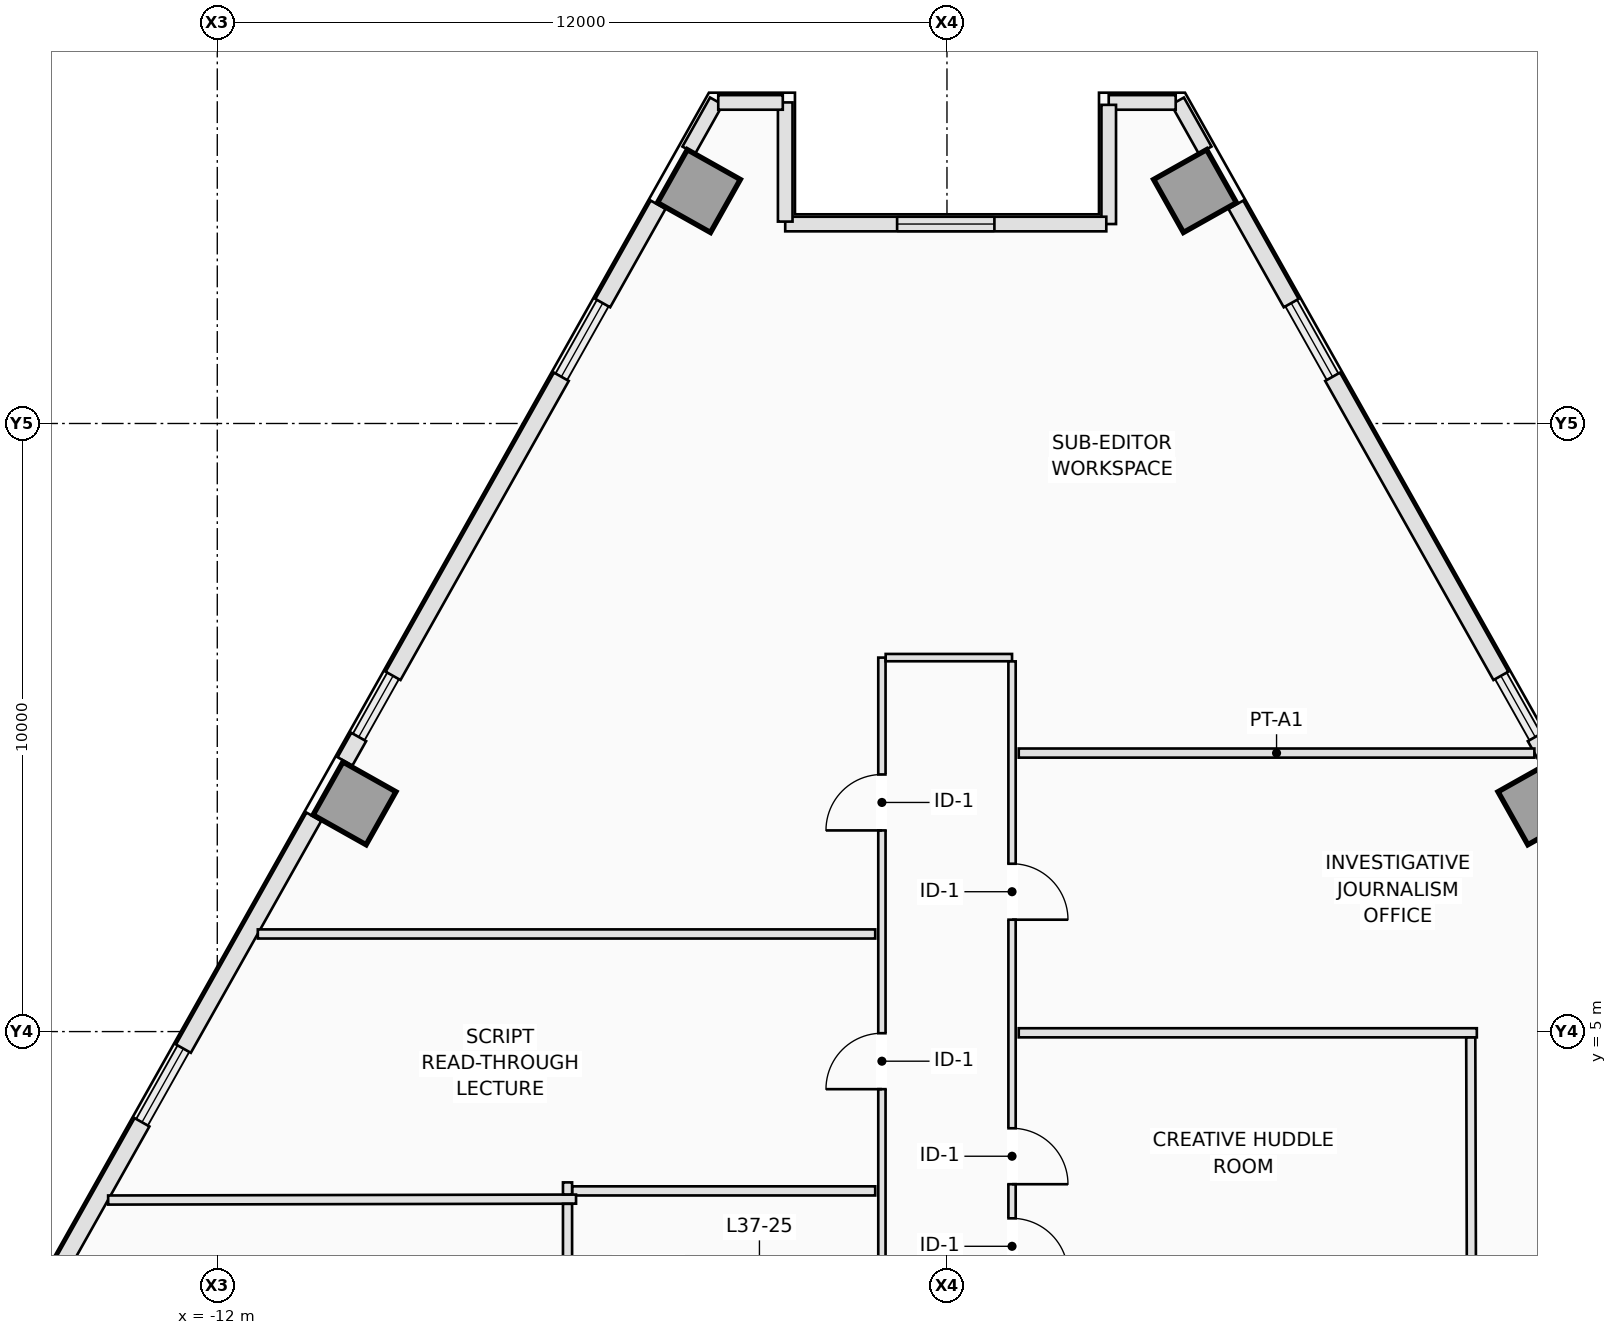
"""IFC4 building model, lengths in metres.
Left out: names, types, materials, properties, quantities, classifications, styles, units other than length and angle.
Written with IfcOpenShell. Run it as: python <this file> out.ifc"""

import sys

from ifc_helpers import new_model, si_unit, direction, frame, frame_2d, origin, origin_2d, place, context, subcontext, project, spatial, rectangle, extrude, element, fill, save


model = new_model("IFC4")
c1 = context("Model", 3, precision=1e-05, world=origin(), true_north=direction((0.0, 1.0)))
c2 = subcontext(c1, "Body", "Model", "MODEL_VIEW")
j1 = project(units=[si_unit("LENGTHUNIT", "METRE"), si_unit("PLANEANGLEUNIT", "RADIAN")], contexts=[c1])
p1 = place(None, origin())
s1 = spatial("IfcSite", under=j1, at=p1, CompositionType="ELEMENT")
p2 = place(p1, origin())
s2 = spatial("IfcBuilding", under=s1, at=p2, CompositionType="ELEMENT")
p3 = place(p2, frame((0.0, 0.0, 137.0)))
s3 = spatial("IfcBuildingStorey", under=s2, at=p3, CompositionType="ELEMENT", Elevation=137.0)
for number, where, z_axis, x_axis in (
    (1, (9.743, 8.753, 0.0), (0.0, 0.0, 1.0), (0.872, 0.49, 0.0)),
    (2, (4.079, 18.822, 0.0), (0.0, 0.0, 1.0), (0.872, 0.49, 0.0)),
    (3, (-4.079, 18.822, 0.0), (0.0, 0.0, 1.0), (-0.872, 0.49, 0.0)),
    (4, (-9.743, 8.753, 0.0), (0.0, 0.0, 1.0), (-0.872, 0.49, 0.0)),
):
    element("IfcColumn", number, at=place(p3, frame(where, z_axis=z_axis, x_axis=x_axis)), inside=s3, PredefinedType="COLUMN", context=c2, shape_type="SweptSolid", body=[
        extrude(rectangle(XDim=1.0, YDim=1.0, at=origin_2d()), origin(), (0.0, 0.0, 1.0), 3.5),
    ])
p4 = place(p3, frame((3.792, 20.302, 0.0), z_axis=(0.0, 0.0, 1.0), x_axis=(0.490048346303, -0.871695255399, 0.0)))
e5 = element("IfcWall", 5, at=p4, inside=s3, PredefinedType="STANDARD", context=c2, shape_type="SweptSolid", body=[
    extrude(rectangle(XDim=0.926, YDim=0.24, at=frame_2d((0.463, 0.0))), origin(), (0.0, 0.0, 1.0), 3.25),
])
p5 = place(p3, frame((4.751, 18.597, 0.0), z_axis=(0.0, 0.0, 1.0), x_axis=(0.490248749158, -0.871582562899, 0.0)))
e6 = element("IfcWall", 6, at=p5, inside=s3, PredefinedType="STANDARD", context=c2, shape_type="SweptSolid", body=[
    extrude(rectangle(XDim=1.856, YDim=0.28, at=frame_2d((0.928, 0.0))), origin(), (0.0, 0.0, 1.0), 3.25),
])
p6 = place(p3, frame((6.342, 15.768, 0.0), z_axis=(0.0, 0.0, 1.0), x_axis=(0.490289995219, -0.871559361483, 0.0)))
e7 = element("IfcWall", 7, at=p6, inside=s3, PredefinedType="STANDARD", context=c2, shape_type="SweptSolid", body=[
    extrude(rectangle(XDim=5.643, YDim=0.28, at=frame_2d((2.822, 0.0))), origin(), (0.0, 0.0, 1.0), 3.25),
])
p7 = place(p3, frame((9.674, 9.845, 0.0), z_axis=(0.0, 0.0, 1.0), x_axis=(0.490412424957, -0.871490478116, 0.0)))
e8 = element("IfcWall", 8, at=p7, inside=s3, PredefinedType="STANDARD", context=c2, shape_type="SweptSolid", body=[
    extrude(rectangle(XDim=0.46, YDim=0.28, at=frame_2d((0.23, 0.0))), origin(), (0.0, 0.0, 1.0), 3.25),
])
p8 = place(p3, frame((-4.246, 19.495, 0.0), z_axis=(0.0, 0.0, 1.0), x_axis=(0.490048346303, 0.871695255399, 0.0)))
e9 = element("IfcWall", 9, at=p8, inside=s3, PredefinedType="STANDARD", context=c2, shape_type="SweptSolid", body=[
    extrude(rectangle(XDim=0.926, YDim=0.24, at=frame_2d((0.463, 0.0))), origin(), (0.0, 0.0, 1.0), 3.25),
])
p9 = place(p3, frame((-9.9, 9.444, 0.0), z_axis=(0.0, 0.0, 1.0), x_axis=(0.490412424957, 0.871490478116, 0.0)))
e10 = element("IfcWall", 10, at=p9, inside=s3, PredefinedType="STANDARD", context=c2, shape_type="SweptSolid", body=[
    extrude(rectangle(XDim=0.46, YDim=0.28, at=frame_2d((0.23, 0.0))), origin(), (0.0, 0.0, 1.0), 3.25),
])
p10 = place(p3, frame((-9.109, 10.85, 0.0), z_axis=(0.0, 0.0, 1.0), x_axis=(0.490289995219, 0.871559361483, 0.0)))
e11 = element("IfcWall", 11, at=p10, inside=s3, PredefinedType="STANDARD", context=c2, shape_type="SweptSolid", body=[
    extrude(rectangle(XDim=5.643, YDim=0.28, at=frame_2d((2.822, 0.0))), origin(), (0.0, 0.0, 1.0), 3.25),
])
p11 = place(p3, frame((-5.661, 16.98, 0.0), z_axis=(0.0, 0.0, 1.0), x_axis=(0.490248749158, 0.871582562899, 0.0)))
e12 = element("IfcWall", 12, at=p11, inside=s3, PredefinedType="STANDARD", context=c2, shape_type="SweptSolid", body=[
    extrude(rectangle(XDim=1.856, YDim=0.28, at=frame_2d((0.928, 0.0))), origin(), (0.0, 0.0, 1.0), 3.25),
])
p12 = place(p3, frame((-15.383, -0.305, 0.0), z_axis=(0.0, 0.0, 1.0), x_axis=(0.490232095789, 0.871591929895, 0.0)))
e13 = element("IfcWall", 13, at=p12, inside=s3, PredefinedType="STANDARD", context=c2, shape_type="SweptSolid", body=[
    extrude(rectangle(XDim=4.375, YDim=0.28, at=frame_2d((2.188, 0.0))), origin(), (0.0, 0.0, 1.0), 3.25),
])
p13 = place(p3, frame((-12.557, 4.72, 0.0), z_axis=(0.0, 0.0, 1.0), x_axis=(0.490274486291, 0.871568085747, 0.0)))
e14 = element("IfcWall", 14, at=p13, inside=s3, PredefinedType="STANDARD", context=c2, shape_type="SweptSolid", body=[
    extrude(rectangle(XDim=4.375, YDim=0.28, at=frame_2d((2.188, 0.0))), origin(), (0.0, 0.0, 1.0), 3.25),
])
p14 = place(p3, frame((3.761, 20.28, 0.0), z_axis=(0.0, 0.0, 1.0), x_axis=(-1.0, 0.0, 0.0)))
e15 = element("IfcWall", 15, at=p14, inside=s3, PredefinedType="STANDARD", context=c2, shape_type="SweptSolid", body=[
    extrude(rectangle(XDim=1.102, YDim=0.24, at=frame_2d((0.551, 0.0))), origin(), (0.0, 0.0, 1.0), 3.25),
])
p15 = place(p3, frame((2.66, 20.24, 0.0), z_axis=(0.0, 0.0, 1.0), x_axis=(0.0, -1.0, 0.0)))
e16 = element("IfcWall", 16, at=p15, inside=s3, PredefinedType="STANDARD", context=c2, shape_type="SweptSolid", body=[
    extrude(rectangle(XDim=1.96, YDim=0.24, at=frame_2d((0.98, 0.0))), origin(), (0.0, 0.0, 1.0), 3.25),
])
p16 = place(p3, frame((2.62, 18.28, 0.0), z_axis=(0.0, 0.0, 1.0), x_axis=(-1.0, 0.0, 0.0)))
e17 = element("IfcWall", 17, at=p16, inside=s3, PredefinedType="STANDARD", context=c2, shape_type="SweptSolid", body=[
    extrude(rectangle(XDim=5.28, YDim=0.24, at=frame_2d((2.64, 0.0))), origin(), (0.0, 0.0, 1.0), 3.25),
])
p17 = place(p16, frame((1.84, 0.0, 0.9)))
e18 = element("IfcOpeningElement", 18, at=p17, cuts=e17, PredefinedType="OPENING", context=c2, shape_type="SweptSolid", body=[
    extrude(rectangle(XDim=1.6, YDim=2.1, at=frame_2d((0.8, 1.05))), frame((0.0, 0.13, 0.0), z_axis=(0.0, -1.0, 0.0), x_axis=(1.0, 0.0, 0.0)), (0.0, 0.0, 1.0), 0.26),
])
p18 = place(p3, frame((-2.66, 18.32, 0.0), z_axis=(0.0, 0.0, 1.0), x_axis=(0.0, 1.0, 0.0)))
e19 = element("IfcWall", 19, at=p18, inside=s3, PredefinedType="STANDARD", context=c2, shape_type="SweptSolid", body=[
    extrude(rectangle(XDim=1.96, YDim=0.24, at=frame_2d((0.98, 0.0))), origin(), (0.0, 0.0, 1.0), 3.25),
])
p19 = place(p3, frame((-2.7, 20.28, 0.0), z_axis=(0.0, 0.0, 1.0), x_axis=(-1.0, 0.0, 0.0)))
e20 = element("IfcWall", 20, at=p19, inside=s3, PredefinedType="STANDARD", context=c2, shape_type="SweptSolid", body=[
    extrude(rectangle(XDim=1.062, YDim=0.24, at=frame_2d((0.531, 0.0))), origin(), (0.0, 0.0, 1.0), 3.25),
])
p20 = place(p3, frame((-1.07, -2.338, 0.0), z_axis=(0.0, 0.0, 1.0), x_axis=(0.0, 1.0, 0.0)))
e21 = element("IfcWall", 21, at=p20, inside=s3, PredefinedType="PARTITIONING", context=c2, shape_type="SweptSolid", body=[
    extrude(rectangle(XDim=13.488, YDim=0.12, at=frame_2d((6.744, 0.0))), origin(), (0.0, 0.0, 1.0), 3.25),
])
p21 = place(p20, frame((10.646, 0.0, 0.0)))
e22 = element("IfcOpeningElement", 22, at=p21, cuts=e21, PredefinedType="OPENING", context=c2, shape_type="SweptSolid", body=[
    extrude(rectangle(XDim=0.92, YDim=2.12, at=frame_2d((0.46, 1.06))), frame((0.0, 0.07, 0.0), z_axis=(0.0, -1.0, 0.0), x_axis=(1.0, 0.0, 0.0)), (0.0, 0.0, 1.0), 0.14),
])
p22 = place(p20, frame((6.391, 0.0, 0.0)))
e23 = element("IfcOpeningElement", 23, at=p22, cuts=e21, PredefinedType="OPENING", context=c2, shape_type="SweptSolid", body=[
    extrude(rectangle(XDim=0.92, YDim=2.12, at=frame_2d((0.46, 1.06))), frame((0.0, 0.07, 0.0), z_axis=(0.0, -1.0, 0.0), x_axis=(1.0, 0.0, 0.0)), (0.0, 0.0, 1.0), 0.14),
])
p23 = place(p20, frame((2.537, 0.0, 0.0)))
e24 = element("IfcOpeningElement", 24, at=p23, cuts=e21, PredefinedType="OPENING", context=c2, shape_type="SweptSolid", body=[
    extrude(rectangle(XDim=0.92, YDim=2.12, at=frame_2d((0.46, 1.06))), frame((0.0, 0.07, 0.0), z_axis=(0.0, -1.0, 0.0), x_axis=(1.0, 0.0, 0.0)), (0.0, 0.0, 1.0), 0.14),
])
p24 = place(p3, frame((-1.008, 11.15, 0.0), z_axis=(0.0, 0.0, 1.0), x_axis=(1.0, 0.0, 0.0)))
e25 = element("IfcWall", 25, at=p24, inside=s3, PredefinedType="PARTITIONING", context=c2, shape_type="SweptSolid", body=[
    extrude(rectangle(XDim=2.078, YDim=0.12, at=frame_2d((1.039, 0.0))), origin(), (0.0, 0.0, 1.0), 3.25),
])
p25 = place(p3, frame((1.07, 11.088, 0.0), z_axis=(0.0, 0.0, 1.0), x_axis=(0.0, -1.0, 0.0)))
e26 = element("IfcWall", 26, at=p25, inside=s3, PredefinedType="PARTITIONING", context=c2, shape_type="SweptSolid", body=[
    extrude(rectangle(XDim=13.488, YDim=0.12, at=frame_2d((6.744, 0.0))), origin(), (0.0, 0.0, 1.0), 3.25),
])
p26 = place(p25, frame((3.328, 0.0, 0.0)))
e27 = element("IfcOpeningElement", 27, at=p26, cuts=e26, PredefinedType="OPENING", context=c2, shape_type="SweptSolid", body=[
    extrude(rectangle(XDim=0.92, YDim=2.12, at=frame_2d((0.46, 1.06))), frame((0.0, 0.07, 0.0), z_axis=(0.0, -1.0, 0.0), x_axis=(1.0, 0.0, 0.0)), (0.0, 0.0, 1.0), 0.14),
])
p27 = place(p25, frame((7.678, 0.0, 0.0)))
e28 = element("IfcOpeningElement", 28, at=p27, cuts=e26, PredefinedType="OPENING", context=c2, shape_type="SweptSolid", body=[
    extrude(rectangle(XDim=0.92, YDim=2.12, at=frame_2d((0.46, 1.06))), frame((0.0, 0.07, 0.0), z_axis=(0.0, -1.0, 0.0), x_axis=(1.0, 0.0, 0.0)), (0.0, 0.0, 1.0), 0.14),
])
p28 = place(p25, frame((9.159, 0.0, 0.0)))
e29 = element("IfcOpeningElement", 29, at=p28, cuts=e26, PredefinedType="OPENING", context=c2, shape_type="SweptSolid", body=[
    extrude(rectangle(XDim=0.92, YDim=2.12, at=frame_2d((0.46, 1.06))), frame((0.0, 0.07, 0.0), z_axis=(0.0, -1.0, 0.0), x_axis=(1.0, 0.0, 0.0)), (0.0, 0.0, 1.0), 0.14),
])
p29 = place(p25, frame((10.349, 0.0, 0.0)))
e30 = element("IfcOpeningElement", 30, at=p29, cuts=e26, PredefinedType="OPENING", context=c2, shape_type="SweptSolid", body=[
    extrude(rectangle(XDim=0.88, YDim=2.12, at=frame_2d((0.44, 1.06))), frame((0.0, 0.07, 0.0), z_axis=(0.0, -1.0, 0.0), x_axis=(1.0, 0.0, 0.0)), (0.0, 0.0, 1.0), 0.14),
])
p30 = place(p3, frame((9.66, 9.58, 0.0), z_axis=(0.0, 0.0, 1.0), x_axis=(-1.0, 0.0, 0.0)))
e31 = element("IfcWall", 31, at=p30, inside=s3, PredefinedType="PARTITIONING", context=c2, shape_type="SweptSolid", body=[
    extrude(rectangle(XDim=8.48, YDim=0.15, at=frame_2d((4.24, 0.0))), origin(), (0.0, 0.0, 1.0), 3.25),
])
p31 = place(p3, frame((-1.18, 6.605, 0.0), z_axis=(0.0, 0.0, 1.0), x_axis=(-1.0, 0.0, 0.0)))
e32 = element("IfcWall", 32, at=p31, inside=s3, PredefinedType="PARTITIONING", context=c2, shape_type="SweptSolid", body=[
    extrude(rectangle(XDim=10.153, YDim=0.15, at=frame_2d((5.077, 0.0))), origin(), (0.0, 0.0, 1.0), 2.891),
])
p32 = place(p3, frame((8.714, 4.98, 0.0), z_axis=(0.0, 0.0, 1.0), x_axis=(-1.0, 0.0, 0.0)))
e33 = element("IfcWall", 33, at=p32, inside=s3, PredefinedType="PARTITIONING", context=c2, shape_type="SweptSolid", body=[
    extrude(rectangle(XDim=7.534, YDim=0.15, at=frame_2d((3.767, 0.0))), origin(), (0.0, 0.0, 1.0), 3.25),
])
p33 = place(p3, frame((8.625, 0.78, 0.0), z_axis=(0.0, 0.0, 1.0), x_axis=(-0.002664604467, 0.999996449935, 0.0)))
e34 = element("IfcWall", 34, at=p33, inside=s3, PredefinedType="PARTITIONING", context=c2, shape_type="SweptSolid", body=[
    extrude(rectangle(XDim=4.123, YDim=0.15, at=frame_2d((2.062, 0.0))), origin(), (0.0, 0.0, 1.0), 3.25),
])
p34 = place(p3, frame((-1.18, 2.38, 0.0), z_axis=(0.0, 0.0, 1.0), x_axis=(-1.0, 0.0, 0.0)))
e35 = element("IfcWall", 35, at=p34, inside=s3, PredefinedType="PARTITIONING", context=c2, shape_type="SweptSolid", body=[
    extrude(rectangle(XDim=4.985, YDim=0.15, at=frame_2d((2.492, 0.0))), origin(), (0.0, 0.0, 1.0), 3.25),
])
p35 = place(p3, frame((-6.1, 2.245, 0.0), z_axis=(0.0, 0.0, 1.0), x_axis=(-0.999998126996, -0.001935459776, 0.0)))
e36 = element("IfcWall", 36, at=p35, inside=s3, PredefinedType="PARTITIONING", context=c2, shape_type="SweptSolid", body=[
    extrude(rectangle(XDim=7.695, YDim=0.15, at=frame_2d((3.847, 0.0))), origin(), (0.0, 0.0, 1.0), 3.25),
])
p36 = place(p3, frame((-6.24, -2.29, 0.0), z_axis=(0.0, 0.0, 1.0), x_axis=(0.0, 1.0, 0.0)))
e37 = element("IfcWall", 37, at=p36, inside=s3, PredefinedType="PARTITIONING", context=c2, shape_type="SweptSolid", body=[
    extrude(rectangle(XDim=4.458, YDim=0.15, at=frame_2d((2.229, 0.0))), origin(), (0.0, 0.0, 1.0), 3.25),
])
p37 = place(p3, frame((-6.24, 2.321, 0.0), z_axis=(0.0, 0.0, 1.0), x_axis=(0.0, 1.0, 0.0)))
e38 = element("IfcWall", 38, at=p37, inside=s3, PredefinedType="PARTITIONING", context=c2, shape_type="SweptSolid", body=[
    extrude(rectangle(XDim=0.199, YDim=0.15, at=frame_2d((0.099, 0.0))), origin(), (0.0, 0.0, 1.0), 3.25),
])
p38 = place(p17, origin())
e39 = element("IfcWindow", 39, at=p38, inside=s3, PartitioningType="SINGLE_PANEL", PredefinedType="WINDOW", context=c2, shape_type="SweptSolid", body=[
    extrude(rectangle(XDim=1.6, YDim=2.1, at=frame_2d((0.8, 1.05))), frame((0.0, 0.03, 0.0), z_axis=(0.0, -1.0, 0.0), x_axis=(1.0, 0.0, 0.0)), (0.0, 0.0, 1.0), 0.06),
])
fill(e18, e39)
p39 = place(p21, origin())
e40 = element("IfcDoor", 40, at=p39, inside=s3, OperationType="SINGLE_SWING_LEFT", PredefinedType="DOOR", context=c2, shape_type="SweptSolid", body=[
    extrude(rectangle(XDim=0.92, YDim=2.12, at=frame_2d((0.46, 1.06))), frame((0.0, 0.025, 0.0), z_axis=(0.0, -1.0, 0.0), x_axis=(1.0, 0.0, 0.0)), (0.0, 0.0, 1.0), 0.05),
])
fill(e22, e40)
p40 = place(p26, origin())
e41 = element("IfcDoor", 41, at=p40, inside=s3, OperationType="SINGLE_SWING_RIGHT", PredefinedType="DOOR", context=c2, shape_type="SweptSolid", body=[
    extrude(rectangle(XDim=0.92, YDim=2.12, at=frame_2d((0.46, 1.06))), frame((0.0, 0.025, 0.0), z_axis=(0.0, -1.0, 0.0), x_axis=(1.0, 0.0, 0.0)), (0.0, 0.0, 1.0), 0.05),
])
fill(e27, e41)
p41 = place(p22, origin())
e42 = element("IfcDoor", 42, at=p41, inside=s3, OperationType="SINGLE_SWING_LEFT", PredefinedType="DOOR", context=c2, shape_type="SweptSolid", body=[
    extrude(rectangle(XDim=0.92, YDim=2.12, at=frame_2d((0.46, 1.06))), frame((0.0, 0.025, 0.0), z_axis=(0.0, -1.0, 0.0), x_axis=(1.0, 0.0, 0.0)), (0.0, 0.0, 1.0), 0.05),
])
fill(e23, e42)
p42 = place(p27, origin())
e43 = element("IfcDoor", 43, at=p42, inside=s3, OperationType="SINGLE_SWING_RIGHT", PredefinedType="DOOR", context=c2, shape_type="SweptSolid", body=[
    extrude(rectangle(XDim=0.92, YDim=2.12, at=frame_2d((0.46, 1.06))), frame((0.0, 0.025, 0.0), z_axis=(0.0, -1.0, 0.0), x_axis=(1.0, 0.0, 0.0)), (0.0, 0.0, 1.0), 0.05),
])
fill(e28, e43)
p43 = place(p28, origin())
e44 = element("IfcDoor", 44, at=p43, inside=s3, OperationType="SINGLE_SWING_RIGHT", PredefinedType="DOOR", context=c2, shape_type="SweptSolid", body=[
    extrude(rectangle(XDim=0.92, YDim=2.12, at=frame_2d((0.46, 1.06))), frame((0.0, 0.025, 0.0), z_axis=(0.0, -1.0, 0.0), x_axis=(1.0, 0.0, 0.0)), (0.0, 0.0, 1.0), 0.05),
])
fill(e29, e44)
save(model, sys.argv[1])
